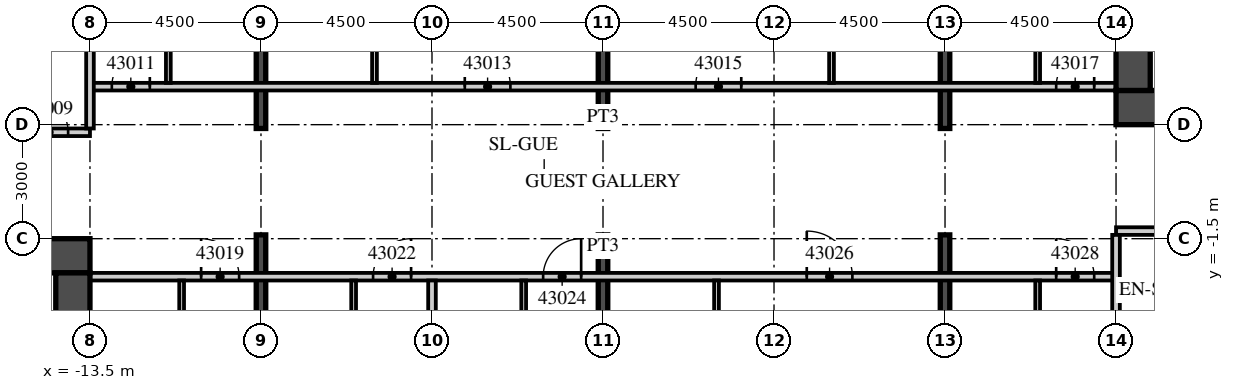
"""IFC4 building model, lengths in metres.
Left out: names, types, materials, properties, quantities, classifications, styles, units other than length and angle.
Written with IfcOpenShell. Run it as: python <this file> out.ifc"""

import sys

from ifc_helpers import new_model, si_unit, direction, frame, frame_2d, origin, place, context, subcontext, project, spatial, rectangle, extrude, element, fill, save


model = new_model("IFC4")
c1 = context("Model", 3, precision=1e-05, world=origin(), true_north=direction((0.0, 1.0)))
c2 = subcontext(c1, "Body", "Model", "MODEL_VIEW")
j1 = project(units=[si_unit("LENGTHUNIT", "METRE"), si_unit("PLANEANGLEUNIT", "RADIAN")], contexts=[c1])
p1 = place(None, origin())
s1 = spatial("IfcSite", under=j1, at=p1, CompositionType="ELEMENT")
p2 = place(p1, origin())
s2 = spatial("IfcBuilding", under=s1, at=p2, CompositionType="ELEMENT")
p3 = place(p2, frame((0.0, 0.0, 183.4)))
s3 = spatial("IfcBuildingStorey", under=s2, at=p3, CompositionType="ELEMENT", Elevation=183.4)
p4 = place(p3, frame((-9.0, -21.845, 0.0), z_axis=(0.0, 0.0, 1.0), x_axis=(0.0, 1.0, 0.0)))
e1 = element("IfcWall", 1, at=p4, inside=s3, PredefinedType="SHEAR", context=c2, shape_type="SweptSolid", body=[
    extrude(rectangle(XDim=20.445, YDim=0.25, at=frame_2d((10.223, 0.0))), origin(), (0.0, 0.0, 1.0), 3.3),
])
p5 = place(p3, frame((-9.0, 1.4, 0.0), z_axis=(0.0, 0.0, 1.0), x_axis=(0.0, 1.0, 0.0)))
e2 = element("IfcWall", 2, at=p5, inside=s3, PredefinedType="SHEAR", context=c2, shape_type="SweptSolid", body=[
    extrude(rectangle(XDim=18.001, YDim=0.25, at=frame_2d((9.0, 0.0))), origin(), (0.0, 0.0, 1.0), 3.3),
])
p6 = place(p3, frame((0.0, -20.979, 0.0), z_axis=(0.0, 0.0, 1.0), x_axis=(0.0, 1.0, 0.0)))
e3 = element("IfcWall", 3, at=p6, inside=s3, PredefinedType="SHEAR", context=c2, shape_type="SweptSolid", body=[
    extrude(rectangle(XDim=19.579, YDim=0.25, at=frame_2d((9.789, 0.0))), origin(), (0.0, 0.0, 1.0), 3.3),
])
p7 = place(p3, frame((0.0, 1.4, 0.0), z_axis=(0.0, 0.0, 1.0), x_axis=(0.0, 1.0, 0.0)))
e4 = element("IfcWall", 4, at=p7, inside=s3, PredefinedType="SHEAR", context=c2, shape_type="SweptSolid", body=[
    extrude(rectangle(XDim=18.867, YDim=0.25, at=frame_2d((9.434, 0.0))), origin(), (0.0, 0.0, 1.0), 3.3),
])
p8 = place(p3, frame((9.0, -20.112, 0.0), z_axis=(0.0, 0.0, 1.0), x_axis=(0.0, 1.0, 0.0)))
e5 = element("IfcWall", 5, at=p8, inside=s3, PredefinedType="SHEAR", context=c2, shape_type="SweptSolid", body=[
    extrude(rectangle(XDim=18.712, YDim=0.25, at=frame_2d((9.356, 0.0))), origin(), (0.0, 0.0, 1.0), 3.3),
])
p9 = place(p3, frame((9.0, 1.4, 0.0), z_axis=(0.0, 0.0, 1.0), x_axis=(0.0, 1.0, 0.0)))
e6 = element("IfcWall", 6, at=p9, inside=s3, PredefinedType="SHEAR", context=c2, shape_type="SweptSolid", body=[
    extrude(rectangle(XDim=19.734, YDim=0.25, at=frame_2d((9.867, 0.0))), origin(), (0.0, 0.0, 1.0), 3.3),
])
p10 = place(p3, frame((-42.913, 1.3, 0.0), z_axis=(0.0, 0.0, 1.0), x_axis=(1.0, 0.0, 0.0)))
e7 = element("IfcWall", 7, at=p10, inside=s3, PredefinedType="PARTITIONING", context=c2, shape_type="SweptSolid", body=[
    extrude(rectangle(XDim=29.413, YDim=0.2, at=frame_2d((14.707, 0.0))), origin(), (0.0, 0.0, 1.0), 3.02),
])
p11 = place(p10, frame((1.406, 0.0, 0.0)))
e8 = element("IfcOpeningElement", 8, at=p11, cuts=e7, PredefinedType="OPENING", context=c2, shape_type="SweptSolid", body=[
    extrude(rectangle(XDim=1.2, YDim=2.1, at=frame_2d((0.6, 1.05))), frame((0.0, 0.11, 0.0), z_axis=(0.0, -1.0, 0.0), x_axis=(1.0, 0.0, 0.0)), (0.0, 0.0, 1.0), 0.22),
])
p12 = place(p10, frame((12.275, 0.0, 0.0)))
e9 = element("IfcOpeningElement", 9, at=p12, cuts=e7, PredefinedType="OPENING", context=c2, shape_type="SweptSolid", body=[
    extrude(rectangle(XDim=1.2, YDim=2.1, at=frame_2d((0.6, 1.05))), frame((0.0, 0.11, 0.0), z_axis=(0.0, -1.0, 0.0), x_axis=(1.0, 0.0, 0.0)), (0.0, 0.0, 1.0), 0.22),
])
p13 = place(p10, frame((18.863, 0.0, 0.0)))
e10 = element("IfcOpeningElement", 10, at=p13, cuts=e7, PredefinedType="OPENING", context=c2, shape_type="SweptSolid", body=[
    extrude(rectangle(XDim=1.0, YDim=2.1, at=frame_2d((0.5, 1.05))), frame((0.0, 0.11, 0.0), z_axis=(0.0, -1.0, 0.0), x_axis=(1.0, 0.0, 0.0)), (0.0, 0.0, 1.0), 0.22),
])
p14 = place(p10, frame((23.338, 0.0, 0.0)))
e11 = element("IfcOpeningElement", 11, at=p14, cuts=e7, PredefinedType="OPENING", context=c2, shape_type="SweptSolid", body=[
    extrude(rectangle(XDim=1.0, YDim=2.1, at=frame_2d((0.5, 1.05))), frame((0.0, 0.11, 0.0), z_axis=(0.0, -1.0, 0.0), x_axis=(1.0, 0.0, 0.0)), (0.0, 0.0, 1.0), 0.22),
])
p15 = place(p10, frame((27.838, 0.0, 0.0)))
e12 = element("IfcOpeningElement", 12, at=p15, cuts=e7, PredefinedType="OPENING", context=c2, shape_type="SweptSolid", body=[
    extrude(rectangle(XDim=1.0, YDim=2.1, at=frame_2d((0.5, 1.05))), frame((0.0, 0.11, 0.0), z_axis=(0.0, -1.0, 0.0), x_axis=(1.0, 0.0, 0.0)), (0.0, 0.0, 1.0), 0.22),
])
p16 = place(p3, frame((-13.5, 2.5, 0.0), z_axis=(0.0, 0.0, 1.0), x_axis=(1.0, 0.0, 0.0)))
e13 = element("IfcWall", 13, at=p16, inside=s3, PredefinedType="PARTITIONING", context=c2, shape_type="SweptSolid", body=[
    extrude(rectangle(XDim=27.0, YDim=0.2, at=frame_2d((13.5, 0.0))), origin(), (0.0, 0.0, 1.0), 3.02),
])
p17 = place(p16, frame((0.575, 0.0, 0.0)))
e14 = element("IfcOpeningElement", 14, at=p17, cuts=e13, PredefinedType="OPENING", context=c2, shape_type="SweptSolid", body=[
    extrude(rectangle(XDim=1.0, YDim=2.1, at=frame_2d((0.5, 1.05))), frame((0.0, 0.11, 0.0), z_axis=(0.0, -1.0, 0.0), x_axis=(1.0, 0.0, 0.0)), (0.0, 0.0, 1.0), 0.22),
])
p18 = place(p16, frame((9.863, 0.0, 0.0)))
e15 = element("IfcOpeningElement", 15, at=p18, cuts=e13, PredefinedType="OPENING", context=c2, shape_type="SweptSolid", body=[
    extrude(rectangle(XDim=1.2, YDim=2.1, at=frame_2d((0.6, 1.05))), frame((0.0, 0.11, 0.0), z_axis=(0.0, -1.0, 0.0), x_axis=(1.0, 0.0, 0.0)), (0.0, 0.0, 1.0), 0.22),
])
p19 = place(p16, frame((15.938, 0.0, 0.0)))
e16 = element("IfcOpeningElement", 16, at=p19, cuts=e13, PredefinedType="OPENING", context=c2, shape_type="SweptSolid", body=[
    extrude(rectangle(XDim=1.2, YDim=2.1, at=frame_2d((0.6, 1.05))), frame((0.0, 0.11, 0.0), z_axis=(0.0, -1.0, 0.0), x_axis=(1.0, 0.0, 0.0)), (0.0, 0.0, 1.0), 0.22),
])
p20 = place(p16, frame((25.425, 0.0, 0.0)))
e17 = element("IfcOpeningElement", 17, at=p20, cuts=e13, PredefinedType="OPENING", context=c2, shape_type="SweptSolid", body=[
    extrude(rectangle(XDim=1.0, YDim=2.1, at=frame_2d((0.5, 1.05))), frame((0.0, 0.11, 0.0), z_axis=(0.0, -1.0, 0.0), x_axis=(1.0, 0.0, 0.0)), (0.0, 0.0, 1.0), 0.22),
])
p21 = place(p3, frame((-13.5, 1.4, 0.0), z_axis=(0.0, 0.0, 1.0), x_axis=(0.0, 1.0, 0.0)))
e18 = element("IfcWall", 18, at=p21, inside=s3, PredefinedType="PARTITIONING", context=c2, shape_type="SweptSolid", body=[
    extrude(rectangle(XDim=17.59, YDim=0.2, at=frame_2d((8.795, 0.0))), origin(), (0.0, 0.0, 1.0), 3.02),
])
p22 = place(p3, frame((-11.438, 2.6, 0.0), z_axis=(0.0, 0.0, 1.0), x_axis=(0.0, 1.0, 0.0)))
e19 = element("IfcWall", 19, at=p22, inside=s3, PredefinedType="PARTITIONING", context=c2, shape_type="SweptSolid", body=[
    extrude(rectangle(XDim=5.225, YDim=0.125, at=frame_2d((2.612, 0.0))), origin(), (0.0, 0.0, 1.0), 3.02),
])
p23 = place(p22, frame((2.45, 0.0, 0.0)))
e20 = element("IfcOpeningElement", 20, at=p23, cuts=e19, PredefinedType="OPENING", context=c2, shape_type="SweptSolid", body=[
    extrude(rectangle(XDim=0.9, YDim=2.1, at=frame_2d((0.45, 1.05))), frame((0.0, 0.073, 0.0), z_axis=(0.0, -1.0, 0.0), x_axis=(1.0, 0.0, 0.0)), (0.0, 0.0, 1.0), 0.145),
])
p24 = place(p3, frame((-6.013, 2.6, 0.0), z_axis=(0.0, 0.0, 1.0), x_axis=(0.0, 1.0, 0.0)))
e21 = element("IfcWall", 21, at=p24, inside=s3, PredefinedType="PARTITIONING", context=c2, shape_type="SweptSolid", body=[
    extrude(rectangle(XDim=5.225, YDim=0.125, at=frame_2d((2.612, 0.0))), origin(), (0.0, 0.0, 1.0), 3.02),
])
p25 = place(p24, frame((2.45, 0.0, 0.0)))
e22 = element("IfcOpeningElement", 22, at=p25, cuts=e21, PredefinedType="OPENING", context=c2, shape_type="SweptSolid", body=[
    extrude(rectangle(XDim=0.9, YDim=2.1, at=frame_2d((0.45, 1.05))), frame((0.0, 0.073, 0.0), z_axis=(0.0, -1.0, 0.0), x_axis=(1.0, 0.0, 0.0)), (0.0, 0.0, 1.0), 0.145),
])
p26 = place(p3, frame((6.013, 2.6, 0.0), z_axis=(0.0, 0.0, 1.0), x_axis=(0.0, 1.0, 0.0)))
e23 = element("IfcWall", 23, at=p26, inside=s3, PredefinedType="PARTITIONING", context=c2, shape_type="SweptSolid", body=[
    extrude(rectangle(XDim=5.225, YDim=0.125, at=frame_2d((2.612, 0.0))), origin(), (0.0, 0.0, 1.0), 3.02),
])
p27 = place(p26, frame((2.45, 0.0, 0.0)))
e24 = element("IfcOpeningElement", 24, at=p27, cuts=e23, PredefinedType="OPENING", context=c2, shape_type="SweptSolid", body=[
    extrude(rectangle(XDim=0.9, YDim=2.1, at=frame_2d((0.45, 1.05))), frame((0.0, 0.073, 0.0), z_axis=(0.0, -1.0, 0.0), x_axis=(1.0, 0.0, 0.0)), (0.0, 0.0, 1.0), 0.145),
])
p28 = place(p3, frame((11.438, 2.6, 0.0), z_axis=(0.0, 0.0, 1.0), x_axis=(0.0, 1.0, 0.0)))
e25 = element("IfcWall", 25, at=p28, inside=s3, PredefinedType="PARTITIONING", context=c2, shape_type="SweptSolid", body=[
    extrude(rectangle(XDim=5.225, YDim=0.125, at=frame_2d((2.612, 0.0))), origin(), (0.0, 0.0, 1.0), 3.02),
])
p29 = place(p28, frame((2.45, 0.0, 0.0)))
e26 = element("IfcOpeningElement", 26, at=p29, cuts=e25, PredefinedType="OPENING", context=c2, shape_type="SweptSolid", body=[
    extrude(rectangle(XDim=0.9, YDim=2.1, at=frame_2d((0.45, 1.05))), frame((0.0, 0.073, 0.0), z_axis=(0.0, -1.0, 0.0), x_axis=(1.0, 0.0, 0.0)), (0.0, 0.0, 1.0), 0.145),
])
p30 = place(p3, frame((-13.5, -2.5, 0.0), z_axis=(0.0, 0.0, 1.0), x_axis=(1.0, 0.0, 0.0)))
e27 = element("IfcWall", 27, at=p30, inside=s3, PredefinedType="PARTITIONING", context=c2, shape_type="SweptSolid", body=[
    extrude(rectangle(XDim=27.0, YDim=0.2, at=frame_2d((13.5, 0.0))), origin(), (0.0, 0.0, 1.0), 3.02),
])
p31 = place(p30, frame((2.925, 0.0, 0.0)))
e28 = element("IfcOpeningElement", 28, at=p31, cuts=e27, PredefinedType="OPENING", context=c2, shape_type="SweptSolid", body=[
    extrude(rectangle(XDim=1.0, YDim=2.1, at=frame_2d((0.5, 1.05))), frame((0.0, 0.11, 0.0), z_axis=(0.0, -1.0, 0.0), x_axis=(1.0, 0.0, 0.0)), (0.0, 0.0, 1.0), 0.22),
])
p32 = place(p30, frame((7.45, 0.0, 0.0)))
e29 = element("IfcOpeningElement", 29, at=p32, cuts=e27, PredefinedType="OPENING", context=c2, shape_type="SweptSolid", body=[
    extrude(rectangle(XDim=1.0, YDim=2.1, at=frame_2d((0.5, 1.05))), frame((0.0, 0.11, 0.0), z_axis=(0.0, -1.0, 0.0), x_axis=(1.0, 0.0, 0.0)), (0.0, 0.0, 1.0), 0.22),
])
p33 = place(p30, frame((11.925, 0.0, 0.0)))
e30 = element("IfcOpeningElement", 30, at=p33, cuts=e27, PredefinedType="OPENING", context=c2, shape_type="SweptSolid", body=[
    extrude(rectangle(XDim=1.0, YDim=2.1, at=frame_2d((0.5, 1.05))), frame((0.0, 0.11, 0.0), z_axis=(0.0, -1.0, 0.0), x_axis=(1.0, 0.0, 0.0)), (0.0, 0.0, 1.0), 0.22),
])
p34 = place(p30, frame((18.862, 0.0, 0.0)))
e31 = element("IfcOpeningElement", 31, at=p34, cuts=e27, PredefinedType="OPENING", context=c2, shape_type="SweptSolid", body=[
    extrude(rectangle(XDim=1.2, YDim=2.1, at=frame_2d((0.6, 1.05))), frame((0.0, 0.11, 0.0), z_axis=(0.0, -1.0, 0.0), x_axis=(1.0, 0.0, 0.0)), (0.0, 0.0, 1.0), 0.22),
])
p35 = place(p30, frame((25.425, 0.0, 0.0)))
e32 = element("IfcOpeningElement", 32, at=p35, cuts=e27, PredefinedType="OPENING", context=c2, shape_type="SweptSolid", body=[
    extrude(rectangle(XDim=1.0, YDim=2.1, at=frame_2d((0.5, 1.05))), frame((0.0, 0.11, 0.0), z_axis=(0.0, -1.0, 0.0), x_axis=(1.0, 0.0, 0.0)), (0.0, 0.0, 1.0), 0.22),
])
p36 = place(p3, frame((13.5, -1.3, 0.0), z_axis=(0.0, 0.0, 1.0), x_axis=(1.0, 0.0, 0.0)))
e33 = element("IfcWall", 33, at=p36, inside=s3, PredefinedType="PARTITIONING", context=c2, shape_type="SweptSolid", body=[
    extrude(rectangle(XDim=26.317, YDim=0.2, at=frame_2d((13.158, 0.0))), origin(), (0.0, 0.0, 1.0), 3.02),
])
p37 = place(p36, frame((2.925, 0.0, 0.0)))
e34 = element("IfcOpeningElement", 34, at=p37, cuts=e33, PredefinedType="OPENING", context=c2, shape_type="SweptSolid", body=[
    extrude(rectangle(XDim=1.0, YDim=2.1, at=frame_2d((0.5, 1.05))), frame((0.0, 0.11, 0.0), z_axis=(0.0, -1.0, 0.0), x_axis=(1.0, 0.0, 0.0)), (0.0, 0.0, 1.0), 0.22),
])
p38 = place(p36, frame((9.862, 0.0, 0.0)))
e35 = element("IfcOpeningElement", 35, at=p38, cuts=e33, PredefinedType="OPENING", context=c2, shape_type="SweptSolid", body=[
    extrude(rectangle(XDim=1.2, YDim=2.1, at=frame_2d((0.6, 1.05))), frame((0.0, 0.11, 0.0), z_axis=(0.0, -1.0, 0.0), x_axis=(1.0, 0.0, 0.0)), (0.0, 0.0, 1.0), 0.22),
])
p39 = place(p36, frame((15.938, 0.0, 0.0)))
e36 = element("IfcOpeningElement", 36, at=p39, cuts=e33, PredefinedType="OPENING", context=c2, shape_type="SweptSolid", body=[
    extrude(rectangle(XDim=1.2, YDim=2.1, at=frame_2d((0.6, 1.05))), frame((0.0, 0.11, 0.0), z_axis=(0.0, -1.0, 0.0), x_axis=(1.0, 0.0, 0.0)), (0.0, 0.0, 1.0), 0.22),
])
p40 = place(p36, frame((25.208, 0.0, 0.0)))
e37 = element("IfcOpeningElement", 37, at=p40, cuts=e33, PredefinedType="OPENING", context=c2, shape_type="SweptSolid", body=[
    extrude(rectangle(XDim=0.9, YDim=2.1, at=frame_2d((0.45, 1.05))), frame((0.0, 0.11, 0.0), z_axis=(0.0, -1.0, 0.0), x_axis=(1.0, 0.0, 0.0)), (0.0, 0.0, 1.0), 0.22),
])
p41 = place(p3, frame((-11.088, -7.825, 0.0), z_axis=(0.0, 0.0, 1.0), x_axis=(0.0, 1.0, 0.0)))
e38 = element("IfcWall", 38, at=p41, inside=s3, PredefinedType="PARTITIONING", context=c2, shape_type="SweptSolid", body=[
    extrude(rectangle(XDim=5.225, YDim=0.125, at=frame_2d((2.612, 0.0))), origin(), (0.0, 0.0, 1.0), 3.02),
])
p42 = place(p41, frame((1.875, 0.0, 0.0)))
e39 = element("IfcOpeningElement", 39, at=p42, cuts=e38, PredefinedType="OPENING", context=c2, shape_type="SweptSolid", body=[
    extrude(rectangle(XDim=0.9, YDim=2.1, at=frame_2d((0.45, 1.05))), frame((0.0, 0.073, 0.0), z_axis=(0.0, -1.0, 0.0), x_axis=(1.0, 0.0, 0.0)), (0.0, 0.0, 1.0), 0.145),
])
p43 = place(p3, frame((-4.5, -21.434, 0.0), z_axis=(0.0, 0.0, 1.0), x_axis=(0.0, 1.0, 0.0)))
e40 = element("IfcWall", 40, at=p43, inside=s3, PredefinedType="PARTITIONING", context=c2, shape_type="SweptSolid", body=[
    extrude(rectangle(XDim=18.834, YDim=0.2, at=frame_2d((9.417, 0.0))), origin(), (0.0, 0.0, 1.0), 3.02),
])
p44 = place(p3, frame((-6.562, -7.825, 0.0), z_axis=(0.0, 0.0, 1.0), x_axis=(0.0, 1.0, 0.0)))
e41 = element("IfcWall", 41, at=p44, inside=s3, PredefinedType="PARTITIONING", context=c2, shape_type="SweptSolid", body=[
    extrude(rectangle(XDim=5.225, YDim=0.125, at=frame_2d((2.612, 0.0))), origin(), (0.0, 0.0, 1.0), 3.02),
])
p45 = place(p44, frame((1.875, 0.0, 0.0)))
e42 = element("IfcOpeningElement", 42, at=p45, cuts=e41, PredefinedType="OPENING", context=c2, shape_type="SweptSolid", body=[
    extrude(rectangle(XDim=0.9, YDim=2.1, at=frame_2d((0.45, 1.05))), frame((0.0, 0.073, 0.0), z_axis=(0.0, -1.0, 0.0), x_axis=(1.0, 0.0, 0.0)), (0.0, 0.0, 1.0), 0.145),
])
p46 = place(p3, frame((-2.087, -7.825, 0.0), z_axis=(0.0, 0.0, 1.0), x_axis=(0.0, 1.0, 0.0)))
e43 = element("IfcWall", 43, at=p46, inside=s3, PredefinedType="PARTITIONING", context=c2, shape_type="SweptSolid", body=[
    extrude(rectangle(XDim=5.225, YDim=0.125, at=frame_2d((2.612, 0.0))), origin(), (0.0, 0.0, 1.0), 3.02),
])
p47 = place(p46, frame((1.875, 0.0, 0.0)))
e44 = element("IfcOpeningElement", 44, at=p47, cuts=e43, PredefinedType="OPENING", context=c2, shape_type="SweptSolid", body=[
    extrude(rectangle(XDim=0.9, YDim=2.1, at=frame_2d((0.45, 1.05))), frame((0.0, 0.073, 0.0), z_axis=(0.0, -1.0, 0.0), x_axis=(1.0, 0.0, 0.0)), (0.0, 0.0, 1.0), 0.145),
])
p48 = place(p3, frame((2.987, -7.825, 0.0), z_axis=(0.0, 0.0, 1.0), x_axis=(0.0, 1.0, 0.0)))
e45 = element("IfcWall", 45, at=p48, inside=s3, PredefinedType="PARTITIONING", context=c2, shape_type="SweptSolid", body=[
    extrude(rectangle(XDim=5.225, YDim=0.125, at=frame_2d((2.612, 0.0))), origin(), (0.0, 0.0, 1.0), 3.02),
])
p49 = place(p48, frame((1.875, 0.0, 0.0)))
e46 = element("IfcOpeningElement", 46, at=p49, cuts=e45, PredefinedType="OPENING", context=c2, shape_type="SweptSolid", body=[
    extrude(rectangle(XDim=0.9, YDim=2.1, at=frame_2d((0.45, 1.05))), frame((0.0, 0.073, 0.0), z_axis=(0.0, -1.0, 0.0), x_axis=(1.0, 0.0, 0.0)), (0.0, 0.0, 1.0), 0.145),
])
p50 = place(p3, frame((13.5, -19.701, 0.0), z_axis=(0.0, 0.0, 1.0), x_axis=(0.0, 1.0, 0.0)))
e47 = element("IfcWall", 47, at=p50, inside=s3, PredefinedType="PARTITIONING", context=c2, shape_type="SweptSolid", body=[
    extrude(rectangle(XDim=18.301, YDim=0.2, at=frame_2d((9.15, 0.0))), origin(), (0.0, 0.0, 1.0), 3.02),
])
p51 = place(p3, frame((11.438, -7.825, 0.0), z_axis=(0.0, 0.0, 1.0), x_axis=(0.0, 1.0, 0.0)))
e48 = element("IfcWall", 48, at=p51, inside=s3, PredefinedType="PARTITIONING", context=c2, shape_type="SweptSolid", body=[
    extrude(rectangle(XDim=5.225, YDim=0.125, at=frame_2d((2.612, 0.0))), origin(), (0.0, 0.0, 1.0), 3.02),
])
p52 = place(p51, frame((1.875, 0.0, 0.0)))
e49 = element("IfcOpeningElement", 49, at=p52, cuts=e48, PredefinedType="OPENING", context=c2, shape_type="SweptSolid", body=[
    extrude(rectangle(XDim=0.9, YDim=2.1, at=frame_2d((0.45, 1.05))), frame((0.0, 0.073, 0.0), z_axis=(0.0, -1.0, 0.0), x_axis=(1.0, 0.0, 0.0)), (0.0, 0.0, 1.0), 0.145),
])
p53 = place(p3, frame((-31.5, -1.95, 0.0), z_axis=(0.0, 0.0, 1.0), x_axis=(1.0, 0.0, 0.0)))
e50 = element("IfcWall", 50, at=p53, inside=s3, PredefinedType="SHEAR", context=c2, shape_type="SweptSolid", body=[
    extrude(rectangle(XDim=18.0, YDim=0.9, at=frame_2d((9.0, 0.0))), origin(), (0.0, 0.0, 1.0), 3.02),
])
p54 = place(p53, frame((14.725, 0.0, 0.0)))
e51 = element("IfcOpeningElement", 51, at=p54, cuts=e50, PredefinedType="OPENING", context=c2, shape_type="SweptSolid", body=[
    extrude(rectangle(XDim=1.8, YDim=2.1, at=frame_2d((0.9, 1.05))), frame((0.0, 0.46, 0.0), z_axis=(0.0, -1.0, 0.0), x_axis=(1.0, 0.0, 0.0)), (0.0, 0.0, 1.0), 0.92),
])
p55 = place(p3, frame((-13.95, -14.6, 0.0), z_axis=(0.0, 0.0, 1.0), x_axis=(0.0, 1.0, 0.0)))
e52 = element("IfcWall", 52, at=p55, inside=s3, PredefinedType="SHEAR", context=c2, shape_type="SweptSolid", body=[
    extrude(rectangle(XDim=12.2, YDim=0.9, at=frame_2d((6.1, 0.0))), origin(), (0.0, 0.0, 1.0), 3.02),
])
p56 = place(p3, frame((13.5, 1.95, 0.0), z_axis=(0.0, 0.0, 1.0), x_axis=(1.0, 0.0, 0.0)))
e53 = element("IfcWall", 53, at=p56, inside=s3, PredefinedType="SHEAR", context=c2, shape_type="SweptSolid", body=[
    extrude(rectangle(XDim=18.0, YDim=0.9, at=frame_2d((9.0, 0.0))), origin(), (0.0, 0.0, 1.0), 3.02),
])
p57 = place(p56, frame((1.475, 0.0, 0.0)))
e54 = element("IfcOpeningElement", 54, at=p57, cuts=e53, PredefinedType="OPENING", context=c2, shape_type="SweptSolid", body=[
    extrude(rectangle(XDim=1.8, YDim=2.1, at=frame_2d((0.9, 1.05))), frame((0.0, 0.46, 0.0), z_axis=(0.0, -1.0, 0.0), x_axis=(1.0, 0.0, 0.0)), (0.0, 0.0, 1.0), 0.92),
])
p58 = place(p3, frame((13.95, 2.4, 0.0), z_axis=(0.0, 0.0, 1.0), x_axis=(0.0, 1.0, 0.0)))
e55 = element("IfcWall", 55, at=p58, inside=s3, PredefinedType="SHEAR", context=c2, shape_type="SweptSolid", body=[
    extrude(rectangle(XDim=12.2, YDim=0.9, at=frame_2d((6.1, 0.0))), origin(), (0.0, 0.0, 1.0), 3.02),
])
p59 = place(p15, origin())
e56 = element("IfcDoor", 56, at=p59, inside=s3, OperationType="SINGLE_SWING_LEFT", PredefinedType="DOOR", context=c2, shape_type="SweptSolid", body=[
    extrude(rectangle(XDim=1.0, YDim=2.1, at=frame_2d((0.5, 1.05))), frame((0.0, 0.025, 0.0), z_axis=(0.0, -1.0, 0.0), x_axis=(1.0, 0.0, 0.0)), (0.0, 0.0, 1.0), 0.05),
])
fill(e12, e56)
p60 = place(p17, origin())
e57 = element("IfcDoor", 57, at=p60, inside=s3, OperationType="SINGLE_SWING_RIGHT", PredefinedType="DOOR", context=c2, shape_type="SweptSolid", body=[
    extrude(rectangle(XDim=1.0, YDim=2.1, at=frame_2d((0.5, 1.05))), frame((0.0, 0.025, 0.0), z_axis=(0.0, -1.0, 0.0), x_axis=(1.0, 0.0, 0.0)), (0.0, 0.0, 1.0), 0.05),
])
fill(e14, e57)
p61 = place(p18, origin())
e58 = element("IfcDoor", 58, at=p61, inside=s3, OperationType="SINGLE_SWING_LEFT", PredefinedType="DOOR", context=c2, shape_type="SweptSolid", body=[
    extrude(rectangle(XDim=1.2, YDim=2.1, at=frame_2d((0.6, 1.05))), frame((0.0, 0.025, 0.0), z_axis=(0.0, -1.0, 0.0), x_axis=(1.0, 0.0, 0.0)), (0.0, 0.0, 1.0), 0.05),
])
fill(e15, e58)
p62 = place(p19, origin())
e59 = element("IfcDoor", 59, at=p62, inside=s3, OperationType="SINGLE_SWING_RIGHT", PredefinedType="DOOR", context=c2, shape_type="SweptSolid", body=[
    extrude(rectangle(XDim=1.2, YDim=2.1, at=frame_2d((0.6, 1.05))), frame((0.0, 0.025, 0.0), z_axis=(0.0, -1.0, 0.0), x_axis=(1.0, 0.0, 0.0)), (0.0, 0.0, 1.0), 0.05),
])
fill(e16, e59)
p63 = place(p20, origin())
e60 = element("IfcDoor", 60, at=p63, inside=s3, OperationType="SINGLE_SWING_RIGHT", PredefinedType="DOOR", context=c2, shape_type="SweptSolid", body=[
    extrude(rectangle(XDim=1.0, YDim=2.1, at=frame_2d((0.5, 1.05))), frame((0.0, 0.025, 0.0), z_axis=(0.0, -1.0, 0.0), x_axis=(1.0, 0.0, 0.0)), (0.0, 0.0, 1.0), 0.05),
])
fill(e17, e60)
p64 = place(p31, origin())
e61 = element("IfcDoor", 61, at=p64, inside=s3, OperationType="SINGLE_SWING_LEFT", PredefinedType="DOOR", context=c2, shape_type="SweptSolid", body=[
    extrude(rectangle(XDim=1.0, YDim=2.1, at=frame_2d((0.5, 1.05))), frame((0.0, 0.025, 0.0), z_axis=(0.0, -1.0, 0.0), x_axis=(1.0, 0.0, 0.0)), (0.0, 0.0, 1.0), 0.05),
])
fill(e28, e61)
p65 = place(p32, origin())
e62 = element("IfcDoor", 62, at=p65, inside=s3, OperationType="SINGLE_SWING_RIGHT", PredefinedType="DOOR", context=c2, shape_type="SweptSolid", body=[
    extrude(rectangle(XDim=1.0, YDim=2.1, at=frame_2d((0.5, 1.05))), frame((0.0, 0.025, 0.0), z_axis=(0.0, -1.0, 0.0), x_axis=(1.0, 0.0, 0.0)), (0.0, 0.0, 1.0), 0.05),
])
fill(e29, e62)
p66 = place(p33, origin())
e63 = element("IfcDoor", 63, at=p66, inside=s3, OperationType="SINGLE_SWING_RIGHT", PredefinedType="DOOR", context=c2, shape_type="SweptSolid", body=[
    extrude(rectangle(XDim=1.0, YDim=2.1, at=frame_2d((0.5, 1.05))), frame((0.0, 0.025, 0.0), z_axis=(0.0, -1.0, 0.0), x_axis=(1.0, 0.0, 0.0)), (0.0, 0.0, 1.0), 0.05),
])
fill(e30, e63)
p67 = place(p34, origin())
e64 = element("IfcDoor", 64, at=p67, inside=s3, OperationType="SINGLE_SWING_LEFT", PredefinedType="DOOR", context=c2, shape_type="SweptSolid", body=[
    extrude(rectangle(XDim=1.2, YDim=2.1, at=frame_2d((0.6, 1.05))), frame((0.0, 0.025, 0.0), z_axis=(0.0, -1.0, 0.0), x_axis=(1.0, 0.0, 0.0)), (0.0, 0.0, 1.0), 0.05),
])
fill(e31, e64)
p68 = place(p35, origin())
e65 = element("IfcDoor", 65, at=p68, inside=s3, OperationType="SINGLE_SWING_LEFT", PredefinedType="DOOR", context=c2, shape_type="SweptSolid", body=[
    extrude(rectangle(XDim=1.0, YDim=2.1, at=frame_2d((0.5, 1.05))), frame((0.0, 0.025, 0.0), z_axis=(0.0, -1.0, 0.0), x_axis=(1.0, 0.0, 0.0)), (0.0, 0.0, 1.0), 0.05),
])
fill(e32, e65)
save(model, sys.argv[1])
